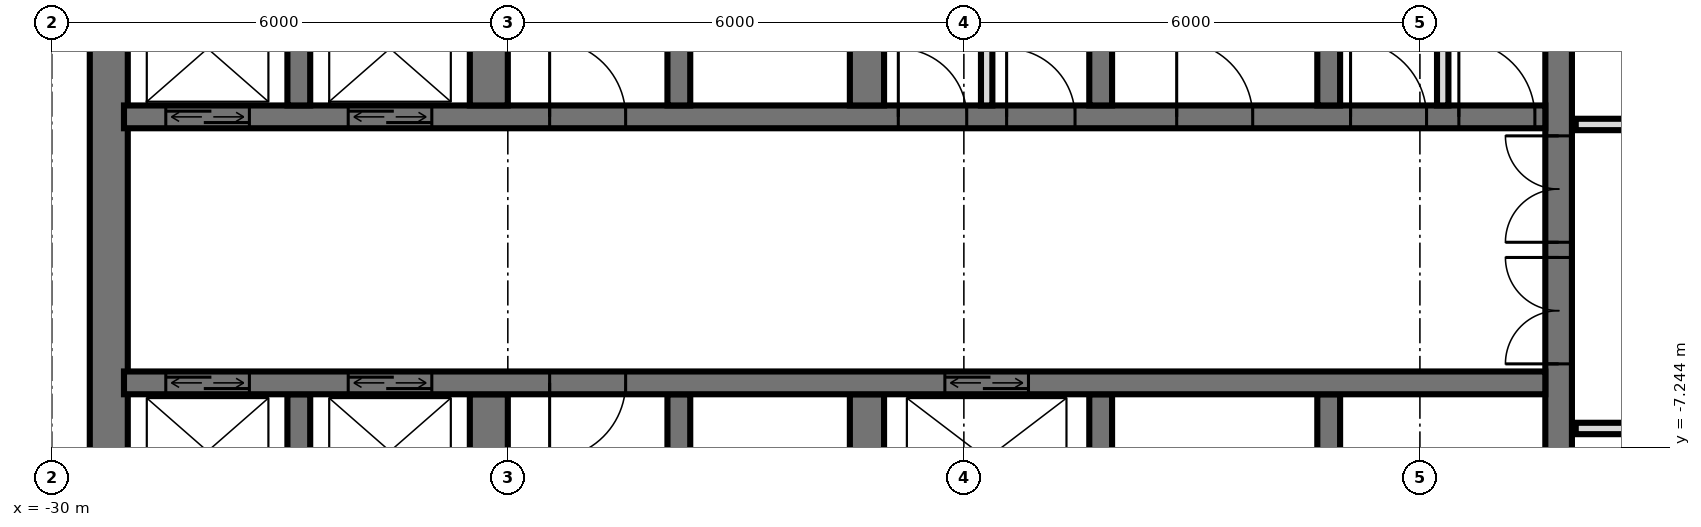
"""IFC4 building model, lengths in metres.
Left out: names, types, materials, properties, quantities, classifications, styles, units other than length and angle.
Written with IfcOpenShell. Run it as: python <this file> out.ifc"""

import sys

from ifc_helpers import new_model, si_unit, direction, frame, frame_2d, origin, place, context, subcontext, project, spatial, rectangle, extrude, element, fill, save


model = new_model("IFC4")
c1 = context("Model", 3, precision=1e-05, world=origin(), true_north=direction((0.0, 1.0)))
c2 = subcontext(c1, "Body", "Model", "MODEL_VIEW")
j1 = project(units=[si_unit("LENGTHUNIT", "METRE"), si_unit("PLANEANGLEUNIT", "RADIAN")], contexts=[c1])
p1 = place(None, origin())
s1 = spatial("IfcSite", under=j1, at=p1, CompositionType="ELEMENT")
p2 = place(p1, origin())
s2 = spatial("IfcBuilding", under=s1, at=p2, CompositionType="ELEMENT")
p3 = place(p2, frame((0.0, 0.0, 24.0)))
s3 = spatial("IfcBuildingStorey", under=s2, at=p3, CompositionType="ELEMENT", Elevation=24.0)
p4 = place(p3, frame((-10.175, -14.55, 0.0), z_axis=(0.0, 0.0, 1.0), x_axis=(0.0, 1.0, 0.0)))
e1 = element("IfcWall", 1, at=p4, inside=s3, PredefinedType="SHEAR", context=c2, shape_type="SweptSolid", body=[
    extrude(rectangle(XDim=14.1, YDim=0.35, at=frame_2d((7.05, 0.0))), origin(), (0.0, 0.0, 1.0), 3.6),
])
p5 = place(p4, frame((8.4, 0.0, 0.0)))
e2 = element("IfcOpeningElement", 2, at=p5, cuts=e1, PredefinedType="OPENING", context=c2, shape_type="SweptSolid", body=[
    extrude(rectangle(XDim=1.4, YDim=2.4, at=frame_2d((0.7, 1.2))), frame((0.0, 0.185, 0.0), z_axis=(0.0, -1.0, 0.0), x_axis=(1.0, 0.0, 0.0)), (0.0, 0.0, 1.0), 0.37),
])
p6 = place(p4, frame((10.0, 0.0, 0.0)))
e3 = element("IfcOpeningElement", 3, at=p6, cuts=e1, PredefinedType="OPENING", context=c2, shape_type="SweptSolid", body=[
    extrude(rectangle(XDim=1.4, YDim=2.4, at=frame_2d((0.7, 1.2))), frame((0.0, 0.185, 0.0), z_axis=(0.0, -1.0, 0.0), x_axis=(1.0, 0.0, 0.0)), (0.0, 0.0, 1.0), 0.37),
])
p7 = place(p4, frame((4.0, 0.0, 0.0)))
e4 = element("IfcOpeningElement", 4, at=p7, cuts=e1, PredefinedType="OPENING", context=c2, shape_type="SweptSolid", body=[
    extrude(rectangle(XDim=1.2, YDim=2.1, at=frame_2d((0.6, 1.05))), frame((0.0, 0.185, 0.0), z_axis=(0.0, -1.0, 0.0), x_axis=(1.0, 0.0, 0.0)), (0.0, 0.0, 1.0), 0.37),
])
p8 = place(p3, frame((-29.25, -14.55, 0.0), z_axis=(0.0, 0.0, 1.0), x_axis=(0.0, 1.0, 0.0)))
e5 = element("IfcWall", 5, at=p8, inside=s3, PredefinedType="SHEAR", context=c2, shape_type="SweptSolid", body=[
    extrude(rectangle(XDim=14.1, YDim=0.5, at=frame_2d((7.05, 0.0))), origin(), (0.0, 0.0, 1.0), 3.6),
])
p9 = place(p3, frame((-29.05, -2.9, 0.0), z_axis=(0.0, 0.0, 1.0), x_axis=(1.0, 0.0, 0.0)))
e6 = element("IfcWall", 6, at=p9, inside=s3, PredefinedType="SHEAR", context=c2, shape_type="SweptSolid", body=[
    extrude(rectangle(XDim=18.7, YDim=0.3, at=frame_2d((9.35, 0.0))), origin(), (0.0, 0.0, 1.0), 3.6),
])
p10 = place(p9, frame((2.95, 0.0, 0.0)))
e7 = element("IfcOpeningElement", 7, at=p10, cuts=e6, PredefinedType="OPENING", context=c2, shape_type="SweptSolid", body=[
    extrude(rectangle(XDim=1.1, YDim=2.1, at=frame_2d((0.55, 1.05))), frame((0.0, 0.16, 0.0), z_axis=(0.0, -1.0, 0.0), x_axis=(1.0, 0.0, 0.0)), (0.0, 0.0, 1.0), 0.32),
])
p11 = place(p9, frame((0.55, 0.0, 0.0)))
e8 = element("IfcOpeningElement", 8, at=p11, cuts=e6, PredefinedType="OPENING", context=c2, shape_type="SweptSolid", body=[
    extrude(rectangle(XDim=1.1, YDim=2.1, at=frame_2d((0.55, 1.05))), frame((0.0, 0.16, 0.0), z_axis=(0.0, -1.0, 0.0), x_axis=(1.0, 0.0, 0.0)), (0.0, 0.0, 1.0), 0.32),
])
p12 = place(p9, frame((11.613, 0.0, 0.0)))
e9 = element("IfcOpeningElement", 9, at=p12, cuts=e6, PredefinedType="OPENING", context=c2, shape_type="SweptSolid", body=[
    extrude(rectangle(XDim=0.9, YDim=2.1, at=frame_2d((0.45, 1.05))), frame((0.0, 0.16, 0.0), z_axis=(0.0, -1.0, 0.0), x_axis=(1.0, 0.0, 0.0)), (0.0, 0.0, 1.0), 0.32),
])
p13 = place(p9, frame((10.188, 0.0, 0.0)))
e10 = element("IfcOpeningElement", 10, at=p13, cuts=e6, PredefinedType="OPENING", context=c2, shape_type="SweptSolid", body=[
    extrude(rectangle(XDim=0.9, YDim=2.1, at=frame_2d((0.45, 1.05))), frame((0.0, 0.16, 0.0), z_axis=(0.0, -1.0, 0.0), x_axis=(1.0, 0.0, 0.0)), (0.0, 0.0, 1.0), 0.32),
])
p14 = place(p9, frame((17.562, 0.0, 0.0)))
e11 = element("IfcOpeningElement", 11, at=p14, cuts=e6, PredefinedType="OPENING", context=c2, shape_type="SweptSolid", body=[
    extrude(rectangle(XDim=1.0, YDim=2.1, at=frame_2d((0.5, 1.05))), frame((0.0, 0.16, 0.0), z_axis=(0.0, -1.0, 0.0), x_axis=(1.0, 0.0, 0.0)), (0.0, 0.0, 1.0), 0.32),
])
p15 = place(p9, frame((16.137, 0.0, 0.0)))
e12 = element("IfcOpeningElement", 12, at=p15, cuts=e6, PredefinedType="OPENING", context=c2, shape_type="SweptSolid", body=[
    extrude(rectangle(XDim=1.0, YDim=2.1, at=frame_2d((0.5, 1.05))), frame((0.0, 0.16, 0.0), z_axis=(0.0, -1.0, 0.0), x_axis=(1.0, 0.0, 0.0)), (0.0, 0.0, 1.0), 0.32),
])
p16 = place(p9, frame((13.85, 0.0, 0.0)))
e13 = element("IfcOpeningElement", 13, at=p16, cuts=e6, PredefinedType="OPENING", context=c2, shape_type="SweptSolid", body=[
    extrude(rectangle(XDim=1.0, YDim=2.1, at=frame_2d((0.5, 1.05))), frame((0.0, 0.16, 0.0), z_axis=(0.0, -1.0, 0.0), x_axis=(1.0, 0.0, 0.0)), (0.0, 0.0, 1.0), 0.32),
])
p17 = place(p9, frame((5.6, 0.0, 0.0)))
e14 = element("IfcOpeningElement", 14, at=p17, cuts=e6, PredefinedType="OPENING", context=c2, shape_type="SweptSolid", body=[
    extrude(rectangle(XDim=1.0, YDim=2.1, at=frame_2d((0.5, 1.05))), frame((0.0, 0.16, 0.0), z_axis=(0.0, -1.0, 0.0), x_axis=(1.0, 0.0, 0.0)), (0.0, 0.0, 1.0), 0.32),
])
p18 = place(p3, frame((-29.05, -6.4, 0.0), z_axis=(0.0, 0.0, 1.0), x_axis=(1.0, 0.0, 0.0)))
e15 = element("IfcWall", 15, at=p18, inside=s3, PredefinedType="SHEAR", context=c2, shape_type="SweptSolid", body=[
    extrude(rectangle(XDim=18.7, YDim=0.3, at=frame_2d((9.35, 0.0))), origin(), (0.0, 0.0, 1.0), 3.6),
])
p19 = place(p18, frame((2.95, 0.0, 0.0)))
e16 = element("IfcOpeningElement", 16, at=p19, cuts=e15, PredefinedType="OPENING", context=c2, shape_type="SweptSolid", body=[
    extrude(rectangle(XDim=1.1, YDim=2.1, at=frame_2d((0.55, 1.05))), frame((0.0, 0.16, 0.0), z_axis=(0.0, -1.0, 0.0), x_axis=(1.0, 0.0, 0.0)), (0.0, 0.0, 1.0), 0.32),
])
p20 = place(p18, frame((0.55, 0.0, 0.0)))
e17 = element("IfcOpeningElement", 17, at=p20, cuts=e15, PredefinedType="OPENING", context=c2, shape_type="SweptSolid", body=[
    extrude(rectangle(XDim=1.1, YDim=2.1, at=frame_2d((0.55, 1.05))), frame((0.0, 0.16, 0.0), z_axis=(0.0, -1.0, 0.0), x_axis=(1.0, 0.0, 0.0)), (0.0, 0.0, 1.0), 0.32),
])
p21 = place(p18, frame((10.8, 0.0, 0.0)))
e18 = element("IfcOpeningElement", 18, at=p21, cuts=e15, PredefinedType="OPENING", context=c2, shape_type="SweptSolid", body=[
    extrude(rectangle(XDim=1.1, YDim=2.1, at=frame_2d((0.55, 1.05))), frame((0.0, 0.16, 0.0), z_axis=(0.0, -1.0, 0.0), x_axis=(1.0, 0.0, 0.0)), (0.0, 0.0, 1.0), 0.32),
])
p22 = place(p18, frame((5.6, 0.0, 0.0)))
e19 = element("IfcOpeningElement", 19, at=p22, cuts=e15, PredefinedType="OPENING", context=c2, shape_type="SweptSolid", body=[
    extrude(rectangle(XDim=1.0, YDim=2.1, at=frame_2d((0.5, 1.05))), frame((0.0, 0.16, 0.0), z_axis=(0.0, -1.0, 0.0), x_axis=(1.0, 0.0, 0.0)), (0.0, 0.0, 1.0), 0.32),
])
for number, where, z_axis, x_axis in (
    (20, (-13.2, -2.75, 0.0), (0.0, 0.0, 1.0), (0.0, 1.0, 0.0)),
    (21, (-13.2, -8.85, 0.0), (0.0, 0.0, 1.0), (0.0, 1.0, 0.0)),
    (22, (-16.2, -2.75, 0.0), (0.0, 0.0, 1.0), (0.0, 1.0, 0.0)),
    (23, (-16.2, -8.85, 0.0), (0.0, 0.0, 1.0), (0.0, 1.0, 0.0)),
):
    element("IfcWall", number, at=place(p3, frame(where, z_axis=z_axis, x_axis=x_axis)), inside=s3, PredefinedType="SHEAR", context=c2, shape_type="SweptSolid", body=[
        extrude(rectangle(XDim=2.3, YDim=0.3, at=frame_2d((1.15, 0.0))), origin(), (0.0, 0.0, 1.0), 3.6),
    ])
for number, where, z_axis, x_axis in (
    (24, (-19.275, -2.75, 0.0), (0.0, 0.0, 1.0), (0.0, 1.0, 0.0)),
    (25, (-19.275, -8.85, 0.0), (0.0, 0.0, 1.0), (0.0, 1.0, 0.0)),
):
    element("IfcWall", number, at=place(p3, frame(where, z_axis=z_axis, x_axis=x_axis)), inside=s3, PredefinedType="SHEAR", context=c2, shape_type="SweptSolid", body=[
        extrude(rectangle(XDim=2.3, YDim=0.45, at=frame_2d((1.15, 0.0))), origin(), (0.0, 0.0, 1.0), 3.6),
    ])
for number, where, z_axis, x_axis in (
    (26, (-21.75, -2.75, 0.0), (0.0, 0.0, 1.0), (0.0, 1.0, 0.0)),
    (27, (-21.75, -8.85, 0.0), (0.0, 0.0, 1.0), (0.0, 1.0, 0.0)),
):
    element("IfcWall", number, at=place(p3, frame(where, z_axis=z_axis, x_axis=x_axis)), inside=s3, PredefinedType="SHEAR", context=c2, shape_type="SweptSolid", body=[
        extrude(rectangle(XDim=2.3, YDim=0.3, at=frame_2d((1.15, 0.0))), origin(), (0.0, 0.0, 1.0), 3.6),
    ])
for number, where, z_axis, x_axis in (
    (28, (-24.25, -2.75, 0.0), (0.0, 0.0, 1.0), (0.0, 1.0, 0.0)),
    (29, (-24.25, -8.85, 0.0), (0.0, 0.0, 1.0), (0.0, 1.0, 0.0)),
):
    element("IfcWall", number, at=place(p3, frame(where, z_axis=z_axis, x_axis=x_axis)), inside=s3, PredefinedType="SHEAR", context=c2, shape_type="SweptSolid", body=[
        extrude(rectangle(XDim=2.3, YDim=0.5, at=frame_2d((1.15, 0.0))), origin(), (0.0, 0.0, 1.0), 3.6),
    ])
for number, where, z_axis, x_axis in (
    (30, (-26.75, -2.75, 0.0), (0.0, 0.0, 1.0), (0.0, 1.0, 0.0)),
    (31, (-26.75, -8.85, 0.0), (0.0, 0.0, 1.0), (0.0, 1.0, 0.0)),
):
    element("IfcWall", number, at=place(p3, frame(where, z_axis=z_axis, x_axis=x_axis)), inside=s3, PredefinedType="SHEAR", context=c2, shape_type="SweptSolid", body=[
        extrude(rectangle(XDim=2.3, YDim=0.3, at=frame_2d((1.15, 0.0))), origin(), (0.0, 0.0, 1.0), 3.6),
    ])
for number, where, z_axis, x_axis in (
    (32, (-17.7, -2.75, 0.0), (0.0, 0.0, 1.0), (0.0, 1.0, 0.0)),
    (33, (-11.7, -2.75, 0.0), (0.0, 0.0, 1.0), (0.0, 1.0, 0.0)),
):
    element("IfcWall", number, at=place(p3, frame(where, z_axis=z_axis, x_axis=x_axis)), inside=s3, PredefinedType="PARTITIONING", context=c2, shape_type="SweptSolid", body=[
        extrude(rectangle(XDim=2.3, YDim=0.15, at=frame_2d((1.15, 0.0))), origin(), (0.0, 0.0, 1.0), 3.3),
    ])
p23 = place(p3, frame((-9.95, -7.0, 0.0), z_axis=(0.0, 0.0, 1.0), x_axis=(1.0, 0.0, 0.0)))
e34 = element("IfcWall", 34, at=p23, inside=s3, PredefinedType="PARTITIONING", context=c2, shape_type="SweptSolid", body=[
    extrude(rectangle(XDim=19.9, YDim=0.15, at=frame_2d((9.95, 0.0))), origin(), (0.0, 0.0, 1.0), 3.32),
])
p24 = place(p23, frame((9.45, 0.0, 0.0)))
e35 = element("IfcOpeningElement", 35, at=p24, cuts=e34, PredefinedType="OPENING", context=c2, shape_type="SweptSolid", body=[
    extrude(rectangle(XDim=1.0, YDim=2.1, at=frame_2d((0.5, 1.05))), frame((0.0, 0.085, 0.0), z_axis=(0.0, -1.0, 0.0), x_axis=(1.0, 0.0, 0.0)), (0.0, 0.0, 1.0), 0.17),
])
p25 = place(p23, frame((3.45, 0.0, 0.0)))
e36 = element("IfcOpeningElement", 36, at=p25, cuts=e34, PredefinedType="OPENING", context=c2, shape_type="SweptSolid", body=[
    extrude(rectangle(XDim=1.0, YDim=2.1, at=frame_2d((0.5, 1.05))), frame((0.0, 0.085, 0.0), z_axis=(0.0, -1.0, 0.0), x_axis=(1.0, 0.0, 0.0)), (0.0, 0.0, 1.0), 0.17),
])
p26 = place(p3, frame((-9.95, -3.0, 0.0), z_axis=(0.0, 0.0, 1.0), x_axis=(1.0, 0.0, 0.0)))
e37 = element("IfcWall", 37, at=p26, inside=s3, PredefinedType="PARTITIONING", context=c2, shape_type="SweptSolid", body=[
    extrude(rectangle(XDim=19.9, YDim=0.15, at=frame_2d((9.95, 0.0))), origin(), (0.0, 0.0, 1.0), 3.32),
])
p27 = place(p26, frame((0.95, 0.0, 0.0)))
e38 = element("IfcOpeningElement", 38, at=p27, cuts=e37, PredefinedType="OPENING", context=c2, shape_type="SweptSolid", body=[
    extrude(rectangle(XDim=1.0, YDim=2.1, at=frame_2d((0.5, 1.05))), frame((0.0, 0.085, 0.0), z_axis=(0.0, -1.0, 0.0), x_axis=(1.0, 0.0, 0.0)), (0.0, 0.0, 1.0), 0.17),
])
p28 = place(p26, frame((3.7, 0.0, 0.0)))
e39 = element("IfcOpeningElement", 39, at=p28, cuts=e37, PredefinedType="OPENING", context=c2, shape_type="SweptSolid", body=[
    extrude(rectangle(XDim=1.0, YDim=2.1, at=frame_2d((0.5, 1.05))), frame((0.0, 0.085, 0.0), z_axis=(0.0, -1.0, 0.0), x_axis=(1.0, 0.0, 0.0)), (0.0, 0.0, 1.0), 0.17),
])
p29 = place(p26, frame((8.45, 0.0, 0.0)))
e40 = element("IfcOpeningElement", 40, at=p29, cuts=e37, PredefinedType="OPENING", context=c2, shape_type="SweptSolid", body=[
    extrude(rectangle(XDim=1.0, YDim=2.1, at=frame_2d((0.5, 1.05))), frame((0.0, 0.085, 0.0), z_axis=(0.0, -1.0, 0.0), x_axis=(1.0, 0.0, 0.0)), (0.0, 0.0, 1.0), 0.17),
])
p30 = place(p26, frame((15.7, 0.0, 0.0)))
e41 = element("IfcOpeningElement", 41, at=p30, cuts=e37, PredefinedType="OPENING", context=c2, shape_type="SweptSolid", body=[
    extrude(rectangle(XDim=1.0, YDim=2.1, at=frame_2d((0.5, 1.05))), frame((0.0, 0.085, 0.0), z_axis=(0.0, -1.0, 0.0), x_axis=(1.0, 0.0, 0.0)), (0.0, 0.0, 1.0), 0.17),
])
p31 = place(p10, origin())
e42 = element("IfcDoor", 42, at=p31, inside=s3, OperationType="DOUBLE_DOOR_SLIDING", PredefinedType="USERDEFINED", context=c2, shape_type="SweptSolid", body=[
    extrude(rectangle(XDim=1.1, YDim=2.1, at=frame_2d((0.55, 1.05))), frame((0.0, 0.025, 0.0), z_axis=(0.0, -1.0, 0.0), x_axis=(1.0, 0.0, 0.0)), (0.0, 0.0, 1.0), 0.05),
])
fill(e7, e42)
p32 = place(p11, origin())
e43 = element("IfcDoor", 43, at=p32, inside=s3, OperationType="DOUBLE_DOOR_SLIDING", PredefinedType="USERDEFINED", context=c2, shape_type="SweptSolid", body=[
    extrude(rectangle(XDim=1.1, YDim=2.1, at=frame_2d((0.55, 1.05))), frame((0.0, 0.025, 0.0), z_axis=(0.0, -1.0, 0.0), x_axis=(1.0, 0.0, 0.0)), (0.0, 0.0, 1.0), 0.05),
])
fill(e8, e43)
p33 = place(p19, origin())
e44 = element("IfcDoor", 44, at=p33, inside=s3, OperationType="DOUBLE_DOOR_SLIDING", PredefinedType="USERDEFINED", context=c2, shape_type="SweptSolid", body=[
    extrude(rectangle(XDim=1.1, YDim=2.1, at=frame_2d((0.55, 1.05))), frame((0.0, 0.025, 0.0), z_axis=(0.0, -1.0, 0.0), x_axis=(1.0, 0.0, 0.0)), (0.0, 0.0, 1.0), 0.05),
])
fill(e16, e44)
p34 = place(p20, origin())
e45 = element("IfcDoor", 45, at=p34, inside=s3, OperationType="DOUBLE_DOOR_SLIDING", PredefinedType="USERDEFINED", context=c2, shape_type="SweptSolid", body=[
    extrude(rectangle(XDim=1.1, YDim=2.1, at=frame_2d((0.55, 1.05))), frame((0.0, 0.025, 0.0), z_axis=(0.0, -1.0, 0.0), x_axis=(1.0, 0.0, 0.0)), (0.0, 0.0, 1.0), 0.05),
])
fill(e17, e45)
p35 = place(p21, origin())
e46 = element("IfcDoor", 46, at=p35, inside=s3, OperationType="DOUBLE_DOOR_SLIDING", PredefinedType="USERDEFINED", context=c2, shape_type="SweptSolid", body=[
    extrude(rectangle(XDim=1.1, YDim=2.1, at=frame_2d((0.55, 1.05))), frame((0.0, 0.025, 0.0), z_axis=(0.0, -1.0, 0.0), x_axis=(1.0, 0.0, 0.0)), (0.0, 0.0, 1.0), 0.05),
])
fill(e18, e46)
p36 = place(p5, origin())
e47 = element("IfcDoor", 47, at=p36, inside=s3, OperationType="DOUBLE_DOOR_SINGLE_SWING", PredefinedType="DOOR", context=c2, shape_type="SweptSolid", body=[
    extrude(rectangle(XDim=1.4, YDim=2.4, at=frame_2d((0.7, 1.2))), frame((0.0, 0.025, 0.0), z_axis=(0.0, -1.0, 0.0), x_axis=(1.0, 0.0, 0.0)), (0.0, 0.0, 1.0), 0.05),
])
fill(e2, e47)
p37 = place(p6, origin())
e48 = element("IfcDoor", 48, at=p37, inside=s3, OperationType="DOUBLE_DOOR_SINGLE_SWING", PredefinedType="DOOR", context=c2, shape_type="SweptSolid", body=[
    extrude(rectangle(XDim=1.4, YDim=2.4, at=frame_2d((0.7, 1.2))), frame((0.0, 0.025, 0.0), z_axis=(0.0, -1.0, 0.0), x_axis=(1.0, 0.0, 0.0)), (0.0, 0.0, 1.0), 0.05),
])
fill(e3, e48)
p38 = place(p12, origin())
e49 = element("IfcDoor", 49, at=p38, inside=s3, OperationType="SINGLE_SWING_RIGHT", PredefinedType="DOOR", context=c2, shape_type="SweptSolid", body=[
    extrude(rectangle(XDim=0.9, YDim=2.1, at=frame_2d((0.45, 1.05))), frame((0.0, 0.025, 0.0), z_axis=(0.0, -1.0, 0.0), x_axis=(1.0, 0.0, 0.0)), (0.0, 0.0, 1.0), 0.05),
])
fill(e9, e49)
p39 = place(p13, origin())
e50 = element("IfcDoor", 50, at=p39, inside=s3, OperationType="SINGLE_SWING_RIGHT", PredefinedType="DOOR", context=c2, shape_type="SweptSolid", body=[
    extrude(rectangle(XDim=0.9, YDim=2.1, at=frame_2d((0.45, 1.05))), frame((0.0, 0.025, 0.0), z_axis=(0.0, -1.0, 0.0), x_axis=(1.0, 0.0, 0.0)), (0.0, 0.0, 1.0), 0.05),
])
fill(e10, e50)
p40 = place(p14, origin())
e51 = element("IfcDoor", 51, at=p40, inside=s3, OperationType="SINGLE_SWING_RIGHT", PredefinedType="DOOR", context=c2, shape_type="SweptSolid", body=[
    extrude(rectangle(XDim=1.0, YDim=2.1, at=frame_2d((0.5, 1.05))), frame((0.0, 0.025, 0.0), z_axis=(0.0, -1.0, 0.0), x_axis=(1.0, 0.0, 0.0)), (0.0, 0.0, 1.0), 0.05),
])
fill(e11, e51)
p41 = place(p15, origin())
e52 = element("IfcDoor", 52, at=p41, inside=s3, OperationType="SINGLE_SWING_RIGHT", PredefinedType="DOOR", context=c2, shape_type="SweptSolid", body=[
    extrude(rectangle(XDim=1.0, YDim=2.1, at=frame_2d((0.5, 1.05))), frame((0.0, 0.025, 0.0), z_axis=(0.0, -1.0, 0.0), x_axis=(1.0, 0.0, 0.0)), (0.0, 0.0, 1.0), 0.05),
])
fill(e12, e52)
p42 = place(p16, origin())
e53 = element("IfcDoor", 53, at=p42, inside=s3, OperationType="SINGLE_SWING_RIGHT", PredefinedType="DOOR", context=c2, shape_type="SweptSolid", body=[
    extrude(rectangle(XDim=1.0, YDim=2.1, at=frame_2d((0.5, 1.05))), frame((0.0, 0.025, 0.0), z_axis=(0.0, -1.0, 0.0), x_axis=(1.0, 0.0, 0.0)), (0.0, 0.0, 1.0), 0.05),
])
fill(e13, e53)
p43 = place(p17, origin())
e54 = element("IfcDoor", 54, at=p43, inside=s3, OperationType="SINGLE_SWING_RIGHT", PredefinedType="DOOR", context=c2, shape_type="SweptSolid", body=[
    extrude(rectangle(XDim=1.0, YDim=2.1, at=frame_2d((0.5, 1.05))), frame((0.0, 0.025, 0.0), z_axis=(0.0, -1.0, 0.0), x_axis=(1.0, 0.0, 0.0)), (0.0, 0.0, 1.0), 0.05),
])
fill(e14, e54)
p44 = place(p22, frame((0.5, 0.0, 0.0), z_axis=(0.0, 0.0, 1.0), x_axis=(-1.0, 0.0, 0.0)))
e55 = element("IfcDoor", 55, at=p44, inside=s3, OperationType="SINGLE_SWING_LEFT", PredefinedType="DOOR", context=c2, shape_type="SweptSolid", body=[
    extrude(rectangle(XDim=1.0, YDim=2.1, at=frame_2d((0.0, 1.05))), frame((0.0, -0.025, 0.0), z_axis=(0.0, 1.0, 0.0), x_axis=(-1.0, 0.0, 0.0)), (0.0, 0.0, 1.0), 0.05),
])
fill(e19, e55)
save(model, sys.argv[1])
